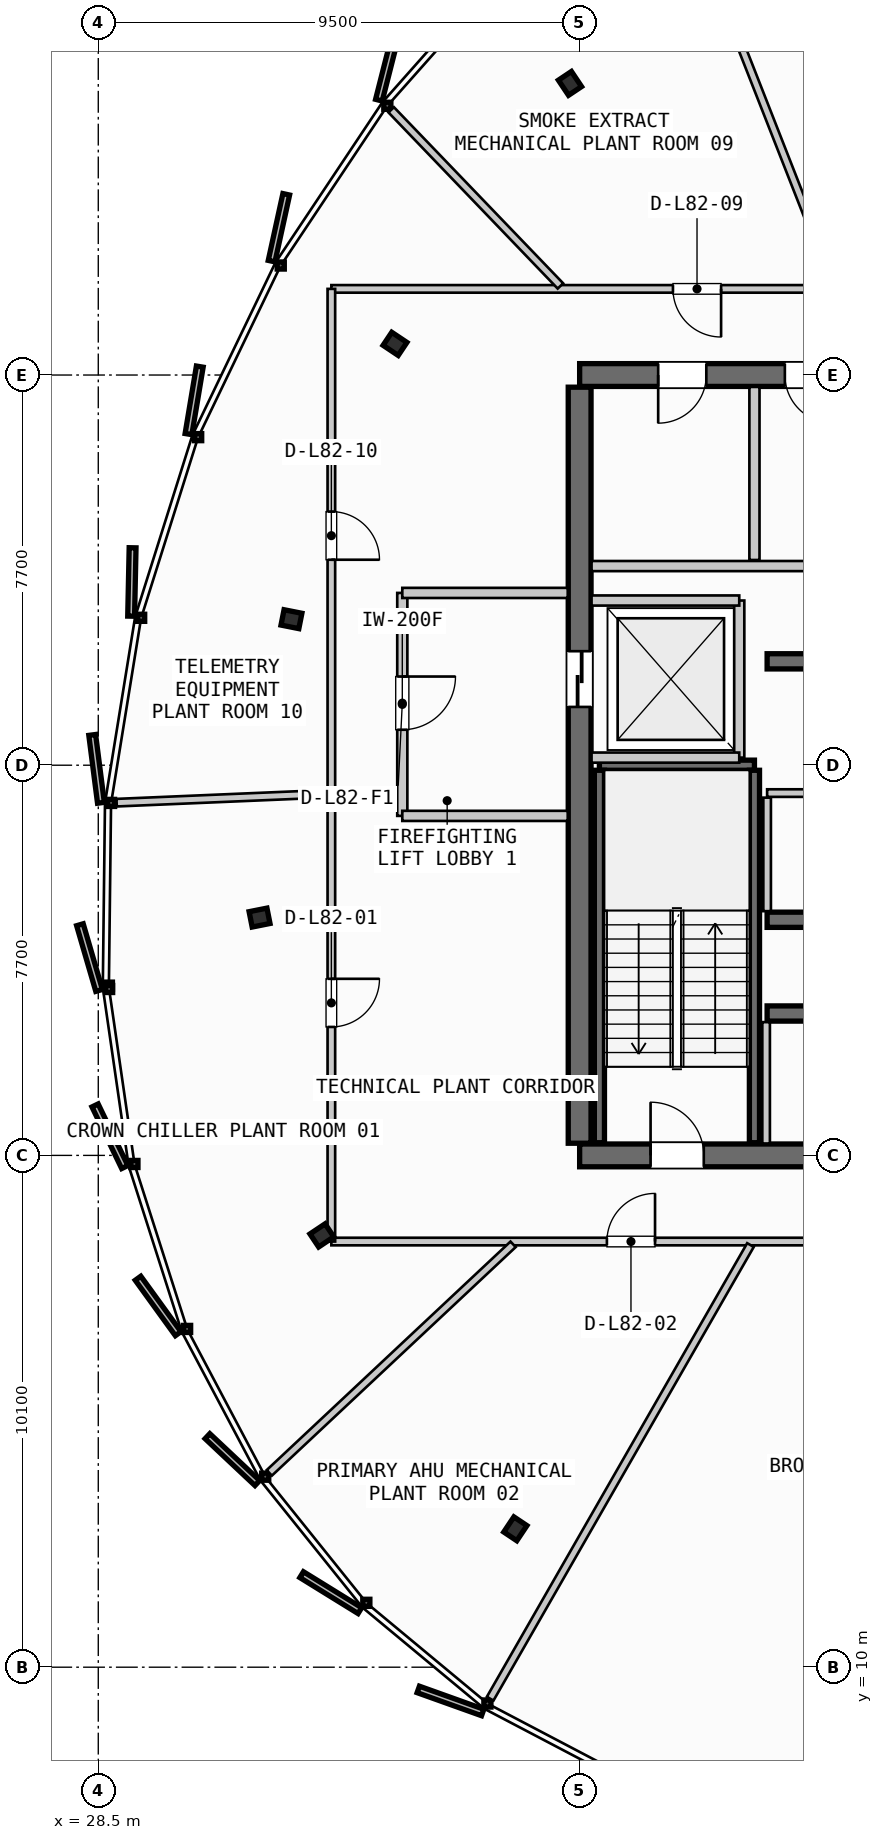
"""IFC4 building model, lengths in metres.
Left out: names, types, materials, properties, quantities, classifications, styles, units other than length and angle.
Written with IfcOpenShell. Run it as: python <this file> out.ifc"""

import sys

from ifc_helpers import new_model, si_unit, direction, frame, frame_2d, origin, origin_2d, place, context, subcontext, project, spatial, rectangle, i_section, extrude, source, transform, mapped, element, fill, save


model = new_model("IFC4")
c1 = context("Model", 3, precision=1e-05, world=origin(), true_north=direction((0.0, 1.0)))
c2 = subcontext(c1, "Body", "Model", "MODEL_VIEW")
j1 = project(units=[si_unit("LENGTHUNIT", "METRE"), si_unit("PLANEANGLEUNIT", "RADIAN")], contexts=[c1])
p1 = place(None, origin())
s1 = spatial("IfcSite", under=j1, at=p1, CompositionType="ELEMENT")
p2 = place(p1, origin())
s2 = spatial("IfcBuilding", under=s1, at=p2, CompositionType="ELEMENT")
p3 = place(p2, frame((0.0, 0.0, 308.3)))
s3 = spatial("IfcBuildingStorey", under=s2, at=p3, CompositionType="ELEMENT", Elevation=308.3)
p4 = place(p3, frame((38.0, 20.1, 0.0), z_axis=(0.0, 0.0, 1.0), x_axis=(1.0, 0.0, 0.0)))
e1 = element("IfcWall", 1, at=p4, inside=s3, PredefinedType="SHEAR", context=c2, shape_type="SweptSolid", body=[
    extrude(rectangle(XDim=17.6, YDim=0.45, at=frame_2d((8.8, 0.0))), origin(), (0.0, 0.0, 1.0), 3.735),
])
p5 = place(p4, frame((1.4, 0.0, 0.0)))
e2 = element("IfcOpeningElement", 2, at=p5, cuts=e1, PredefinedType="OPENING", context=c2, shape_type="SweptSolid", body=[
    extrude(rectangle(XDim=1.05, YDim=2.15, at=frame_2d((0.525, 1.075))), frame((0.0, 0.235, 0.0), z_axis=(0.0, -1.0, 0.0), x_axis=(1.0, 0.0, 0.0)), (0.0, 0.0, 1.0), 0.47),
])
p6 = place(p4, frame((15.15, 0.0, 0.0)))
e3 = element("IfcOpeningElement", 3, at=p6, cuts=e1, PredefinedType="OPENING", context=c2, shape_type="SweptSolid", body=[
    extrude(rectangle(XDim=1.05, YDim=2.15, at=frame_2d((0.525, 1.075))), frame((0.0, 0.235, 0.0), z_axis=(0.0, -1.0, 0.0), x_axis=(1.0, 0.0, 0.0)), (0.0, 0.0, 1.0), 0.47),
])
p7 = place(p4, frame((5.25, 0.0, 0.0)))
e4 = element("IfcOpeningElement", 4, at=p7, cuts=e1, PredefinedType="OPENING", context=c2, shape_type="SweptSolid", body=[
    extrude(rectangle(XDim=0.95, YDim=2.15, at=frame_2d((0.475, 1.075))), frame((0.0, 0.235, 0.0), z_axis=(0.0, -1.0, 0.0), x_axis=(1.0, 0.0, 0.0)), (0.0, 0.0, 1.0), 0.47),
])
p8 = place(p4, frame((11.4, 0.0, 0.0)))
e5 = element("IfcOpeningElement", 5, at=p8, cuts=e1, PredefinedType="OPENING", context=c2, shape_type="SweptSolid", body=[
    extrude(rectangle(XDim=0.95, YDim=2.15, at=frame_2d((0.475, 1.075))), frame((0.0, 0.235, 0.0), z_axis=(0.0, -1.0, 0.0), x_axis=(1.0, 0.0, 0.0)), (0.0, 0.0, 1.0), 0.47),
])
p9 = place(p3, frame((55.6, 35.5, 0.0), z_axis=(0.0, 0.0, 1.0), x_axis=(-1.0, 0.0, 0.0)))
e6 = element("IfcWall", 6, at=p9, inside=s3, PredefinedType="SHEAR", context=c2, shape_type="SweptSolid", body=[
    extrude(rectangle(XDim=17.6, YDim=0.45, at=frame_2d((8.8, 0.0))), origin(), (0.0, 0.0, 1.0), 3.735),
])
p10 = place(p9, frame((8.05, 0.0, 0.0)))
e7 = element("IfcOpeningElement", 7, at=p10, cuts=e6, PredefinedType="OPENING", context=c2, shape_type="SweptSolid", body=[
    extrude(rectangle(XDim=1.5, YDim=2.2, at=frame_2d((0.75, 1.1))), frame((0.0, 0.235, 0.0), z_axis=(0.0, -1.0, 0.0), x_axis=(1.0, 0.0, 0.0)), (0.0, 0.0, 1.0), 0.47),
])
p11 = place(p9, frame((15.1, 0.0, 0.0)))
e8 = element("IfcOpeningElement", 8, at=p11, cuts=e6, PredefinedType="OPENING", context=c2, shape_type="SweptSolid", body=[
    extrude(rectangle(XDim=0.95, YDim=2.15, at=frame_2d((0.475, 1.075))), frame((0.0, 0.235, 0.0), z_axis=(0.0, -1.0, 0.0), x_axis=(1.0, 0.0, 0.0)), (0.0, 0.0, 1.0), 0.47),
])
p12 = place(p9, frame((12.6, 0.0, 0.0)))
e9 = element("IfcOpeningElement", 9, at=p12, cuts=e6, PredefinedType="OPENING", context=c2, shape_type="SweptSolid", body=[
    extrude(rectangle(XDim=0.95, YDim=2.15, at=frame_2d((0.475, 1.075))), frame((0.0, 0.235, 0.0), z_axis=(0.0, -1.0, 0.0), x_axis=(1.0, 0.0, 0.0)), (0.0, 0.0, 1.0), 0.47),
])
p13 = place(p9, frame((10.45, 0.0, 0.0)))
e10 = element("IfcOpeningElement", 10, at=p13, cuts=e6, PredefinedType="OPENING", context=c2, shape_type="SweptSolid", body=[
    extrude(rectangle(XDim=0.95, YDim=2.15, at=frame_2d((0.475, 1.075))), frame((0.0, 0.235, 0.0), z_axis=(0.0, -1.0, 0.0), x_axis=(1.0, 0.0, 0.0)), (0.0, 0.0, 1.0), 0.47),
])
p14 = place(p3, frame((38.0, 35.26, 0.0), z_axis=(0.0, 0.0, 1.0), x_axis=(0.0, -1.0, 0.0)))
e11 = element("IfcWall", 11, at=p14, inside=s3, PredefinedType="SHEAR", context=c2, shape_type="SweptSolid", body=[
    extrude(rectangle(XDim=14.92, YDim=0.45, at=frame_2d((7.46, 0.0))), origin(), (0.0, 0.0, 1.0), 3.735),
])
p15 = place(p14, frame((5.21, 0.0, 0.0)))
e12 = element("IfcOpeningElement", 12, at=p15, cuts=e11, PredefinedType="OPENING", context=c2, shape_type="SweptSolid", body=[
    extrude(rectangle(XDim=1.1, YDim=2.2, at=frame_2d((0.55, 1.1))), frame((0.0, 0.235, 0.0), z_axis=(0.0, -1.0, 0.0), x_axis=(1.0, 0.0, 0.0)), (0.0, 0.0, 1.0), 0.47),
])
p16 = place(p3, frame((41.7, 22.9, 0.0), z_axis=(0.0, 0.0, 1.0), x_axis=(1.0, 0.0, 0.0)))
e13 = element("IfcWall", 13, at=p16, inside=s3, PredefinedType="SHEAR", context=c2, shape_type="SweptSolid", body=[
    extrude(rectangle(XDim=4.25, YDim=0.3, at=frame_2d((2.125, 0.0))), origin(), (0.0, 0.0, 1.0), 3.735),
])
p17 = place(p3, frame((41.7, 24.75, 0.0), z_axis=(0.0, 0.0, 1.0), x_axis=(1.0, 0.0, 0.0)))
e14 = element("IfcWall", 14, at=p17, inside=s3, PredefinedType="SHEAR", context=c2, shape_type="SweptSolid", body=[
    extrude(rectangle(XDim=4.25, YDim=0.3, at=frame_2d((2.125, 0.0))), origin(), (0.0, 0.0, 1.0), 3.735),
])
p18 = place(p17, frame((1.55, 0.0, 0.0)))
e15 = element("IfcOpeningElement", 15, at=p18, cuts=e14, PredefinedType="OPENING", context=c2, shape_type="SweptSolid", body=[
    extrude(rectangle(XDim=0.95, YDim=2.15, at=frame_2d((0.475, 1.075))), frame((0.0, 0.16, 0.0), z_axis=(0.0, -1.0, 0.0), x_axis=(1.0, 0.0, 0.0)), (0.0, 0.0, 1.0), 0.32),
])
p19 = place(p3, frame((41.7, 29.85, 0.0), z_axis=(0.0, 0.0, 1.0), x_axis=(1.0, 0.0, 0.0)))
e16 = element("IfcWall", 16, at=p19, inside=s3, PredefinedType="SHEAR", context=c2, shape_type="SweptSolid", body=[
    extrude(rectangle(XDim=4.25, YDim=0.3, at=frame_2d((2.125, 0.0))), origin(), (0.0, 0.0, 1.0), 3.735),
])
m1 = source(origin(), c2, "Body", "SweptSolid", [
    extrude(i_section(OverallWidth=0.309, OverallDepth=0.359, WebThickness=0.016, FlangeThickness=0.026, FilletRadius=0.027, at=origin_2d()), origin(), (0.0, 0.0, 1.0), 3.735),
])
for number, where, z_axis, x_axis in (
    (17, (37.81, 41.255, 0.0), (0.0, 0.0, 1.0), (-0.556, 0.831, 0.0)),
    (18, (34.356, 36.115, 0.0), (0.0, 0.0, 1.0), (-0.831, 0.556, 0.0)),
    (19, (32.312, 30.682, 0.0), (0.0, 0.0, 1.0), (-0.981, 0.195, 0.0)),
    (20, (31.683, 24.793, 0.0), (0.0, 0.0, 1.0), (-0.981, -0.195, 0.0)),
    (21, (32.913, 18.521, 0.0), (0.0, 0.0, 1.0), (-0.831, -0.556, 0.0)),
    (22, (36.731, 12.731, 0.0), (0.0, 0.0, 1.0), (-0.556, -0.831, 0.0)),
):
    element("IfcColumn", number, at=place(p3, frame(where, z_axis=z_axis, x_axis=x_axis)), inside=s3, PredefinedType="COLUMN", context=c2, shape_type="MappedRepresentation", body=[
        mapped(m1, transform((0.0, 0.0, 0.0), scale=1.0)),
    ])
p20 = place(p3, frame((38.39, 27.8, 0.0), z_axis=(0.0, 0.0, 1.0), x_axis=(1.0, 0.0, 0.0)))
e23 = element("IfcWall", 23, at=p20, inside=s3, PredefinedType="SHEAR", context=c2, shape_type="SweptSolid", body=[
    extrude(rectangle(XDim=3.06, YDim=0.2, at=frame_2d((1.53, 0.0))), origin(), (0.0, 0.0, 1.0), 3.735),
])
for number, where, z_axis, x_axis in (
    (24, (41.45, 27.7, 0.0), (0.0, 0.0, 1.0), (0.0, -1.0, 0.0)),
    (25, (38.39, 20.35, 0.0), (0.0, 0.0, 1.0), (0.0, 1.0, 0.0)),
):
    element("IfcWall", number, at=place(p3, frame(where, z_axis=z_axis, x_axis=x_axis)), inside=s3, PredefinedType="SHEAR", context=c2, shape_type="SweptSolid", body=[
        extrude(rectangle(XDim=7.35, YDim=0.2, at=frame_2d((3.675, 0.0))), origin(), (0.0, 0.0, 1.0), 3.735),
    ])
p21 = place(p3, frame((41.15, 27.95, 0.0), z_axis=(0.0, 0.0, 1.0), x_axis=(0.0, 1.0, 0.0)))
e26 = element("IfcWall", 26, at=p21, inside=s3, PredefinedType="PARTITIONING", context=c2, shape_type="SweptSolid", body=[
    extrude(rectangle(XDim=3.1, YDim=0.2, at=frame_2d((1.55, 0.0))), origin(), (0.0, 0.0, 1.0), 3.26),
])
for number, where, z_axis, x_axis in (
    (27, (38.235, 27.95, 0.0), (0.0, 0.0, 1.0), (1.0, 0.0, 0.0)),
    (28, (38.235, 31.05, 0.0), (0.0, 0.0, 1.0), (1.0, 0.0, 0.0)),
):
    element("IfcWall", number, at=place(p3, frame(where, z_axis=z_axis, x_axis=x_axis)), inside=s3, PredefinedType="PARTITIONING", context=c2, shape_type="SweptSolid", body=[
        extrude(rectangle(XDim=2.915, YDim=0.2, at=frame_2d((1.458, 0.0))), origin(), (0.0, 0.0, 1.0), 3.26),
    ])
p22 = place(p3, frame((34.5, 31.2, 0.0), z_axis=(0.0, 0.0, 1.0), x_axis=(0.0, -1.0, 0.0)))
e29 = element("IfcWall", 29, at=p22, inside=s3, PredefinedType="PARTITIONING", context=c2, shape_type="SweptSolid", body=[
    extrude(rectangle(XDim=4.4, YDim=0.2, at=frame_2d((2.2, 0.0))), origin(), (0.0, 0.0, 1.0), 3.26),
])
p23 = place(p22, frame((1.65, 0.0, 0.0)))
e30 = element("IfcOpeningElement", 30, at=p23, cuts=e29, PredefinedType="OPENING", context=c2, shape_type="SweptSolid", body=[
    extrude(rectangle(XDim=1.05, YDim=2.15, at=frame_2d((0.525, 1.075))), frame((0.0, 0.11, 0.0), z_axis=(0.0, -1.0, 0.0), x_axis=(1.0, 0.0, 0.0)), (0.0, 0.0, 1.0), 0.22),
])
for number, where, z_axis, x_axis in (
    (31, (34.5, 26.8, 0.0), (0.0, 0.0, 1.0), (1.0, 0.0, 0.0)),
    (32, (34.5, 31.2, 0.0), (0.0, 0.0, 1.0), (1.0, 0.0, 0.0)),
):
    element("IfcWall", number, at=place(p3, frame(where, z_axis=z_axis, x_axis=x_axis)), inside=s3, PredefinedType="PARTITIONING", context=c2, shape_type="SweptSolid", body=[
        extrude(rectangle(XDim=3.265, YDim=0.2, at=frame_2d((1.632, 0.0))), origin(), (0.0, 0.0, 1.0), 3.26),
    ])
p24 = place(p3, frame((41.68, 20.335, 0.0), z_axis=(0.0, 0.0, 1.0), x_axis=(0.0, 1.0, 0.0)))
e33 = element("IfcWall", 33, at=p24, inside=s3, PredefinedType="PARTITIONING", context=c2, shape_type="SweptSolid", body=[
    extrude(rectangle(XDim=2.395, YDim=0.15, at=frame_2d((1.198, 0.0))), origin(), (0.0, 0.0, 1.0), 3.26),
])
p25 = place(p3, frame((41.7, 27.25, 0.0), z_axis=(0.0, 0.0, 1.0), x_axis=(1.0, 0.0, 0.0)))
e34 = element("IfcWall", 34, at=p25, inside=s3, PredefinedType="PARTITIONING", context=c2, shape_type="SweptSolid", body=[
    extrude(rectangle(XDim=4.25, YDim=0.15, at=frame_2d((2.125, 0.0))), origin(), (0.0, 0.0, 1.0), 3.26),
])
p26 = place(p3, frame((41.7, 24.92, 0.0), z_axis=(0.0, 0.0, 1.0), x_axis=(0.0, 1.0, 0.0)))
e35 = element("IfcWall", 35, at=p26, inside=s3, PredefinedType="PARTITIONING", context=c2, shape_type="SweptSolid", body=[
    extrude(rectangle(XDim=2.24, YDim=0.15, at=frame_2d((1.12, 0.0))), origin(), (0.0, 0.0, 1.0), 3.26),
])
p27 = place(p3, frame((41.45, 31.85, 0.0), z_axis=(0.0, 0.0, 1.0), x_axis=(0.0, 1.0, 0.0)))
e36 = element("IfcWall", 36, at=p27, inside=s3, PredefinedType="PARTITIONING", context=c2, shape_type="SweptSolid", body=[
    extrude(rectangle(XDim=3.415, YDim=0.2, at=frame_2d((1.708, 0.0))), origin(), (0.0, 0.0, 1.0), 3.26),
])
p28 = place(p3, frame((38.235, 31.73, 0.0), z_axis=(0.0, 0.0, 1.0), x_axis=(1.0, 0.0, 0.0)))
e37 = element("IfcWall", 37, at=p28, inside=s3, PredefinedType="PARTITIONING", context=c2, shape_type="SweptSolid", body=[
    extrude(rectangle(XDim=7.565, YDim=0.2, at=frame_2d((3.782, 0.0))), origin(), (0.0, 0.0, 1.0), 3.26),
])
p29 = place(p3, frame((33.1, 18.4, 0.0), z_axis=(0.0, 0.0, 1.0), x_axis=(1.0, 0.0, 0.0)))
e38 = element("IfcWall", 38, at=p29, inside=s3, PredefinedType="PARTITIONING", context=c2, shape_type="SweptSolid", body=[
    extrude(rectangle(XDim=27.4, YDim=0.15, at=frame_2d((13.7, 0.0))), origin(), (0.0, 0.0, 1.0), 3.26),
])
p30 = place(p29, frame((5.438, 0.0, 0.0)))
e39 = element("IfcOpeningElement", 39, at=p30, cuts=e38, PredefinedType="OPENING", context=c2, shape_type="SweptSolid", body=[
    extrude(rectangle(XDim=0.95, YDim=2.15, at=frame_2d((0.475, 1.075))), frame((0.0, 0.085, 0.0), z_axis=(0.0, -1.0, 0.0), x_axis=(1.0, 0.0, 0.0)), (0.0, 0.0, 1.0), 0.17),
])
p31 = place(p29, frame((12.49, 0.0, 0.0)))
e40 = element("IfcOpeningElement", 40, at=p31, cuts=e38, PredefinedType="OPENING", context=c2, shape_type="SweptSolid", body=[
    extrude(rectangle(XDim=0.95, YDim=2.15, at=frame_2d((0.475, 1.075))), frame((0.0, 0.085, 0.0), z_axis=(0.0, -1.0, 0.0), x_axis=(1.0, 0.0, 0.0)), (0.0, 0.0, 1.0), 0.17),
])
p32 = place(p29, frame((19.863, 0.0, 0.0)))
e41 = element("IfcOpeningElement", 41, at=p32, cuts=e38, PredefinedType="OPENING", context=c2, shape_type="SweptSolid", body=[
    extrude(rectangle(XDim=0.95, YDim=2.15, at=frame_2d((0.475, 1.075))), frame((0.0, 0.085, 0.0), z_axis=(0.0, -1.0, 0.0), x_axis=(1.0, 0.0, 0.0)), (0.0, 0.0, 1.0), 0.17),
])
p33 = place(p3, frame((60.5, 37.2, 0.0), z_axis=(0.0, 0.0, 1.0), x_axis=(-1.0, 0.0, 0.0)))
e42 = element("IfcWall", 42, at=p33, inside=s3, PredefinedType="PARTITIONING", context=c2, shape_type="SweptSolid", body=[
    extrude(rectangle(XDim=27.4, YDim=0.15, at=frame_2d((13.7, 0.0))), origin(), (0.0, 0.0, 1.0), 3.26),
])
p34 = place(p33, frame((4.03, 0.0, 0.0)))
e43 = element("IfcOpeningElement", 43, at=p34, cuts=e42, PredefinedType="OPENING", context=c2, shape_type="SweptSolid", body=[
    extrude(rectangle(XDim=0.95, YDim=2.15, at=frame_2d((0.475, 1.075))), frame((0.0, 0.085, 0.0), z_axis=(0.0, -1.0, 0.0), x_axis=(1.0, 0.0, 0.0)), (0.0, 0.0, 1.0), 0.17),
])
p35 = place(p33, frame((12.447, 0.0, 0.0)))
e44 = element("IfcOpeningElement", 44, at=p35, cuts=e42, PredefinedType="OPENING", context=c2, shape_type="SweptSolid", body=[
    extrude(rectangle(XDim=0.95, YDim=2.15, at=frame_2d((0.475, 1.075))), frame((0.0, 0.085, 0.0), z_axis=(0.0, -1.0, 0.0), x_axis=(1.0, 0.0, 0.0)), (0.0, 0.0, 1.0), 0.17),
])
p36 = place(p33, frame((19.708, 0.0, 0.0)))
e45 = element("IfcOpeningElement", 45, at=p36, cuts=e42, PredefinedType="OPENING", context=c2, shape_type="SweptSolid", body=[
    extrude(rectangle(XDim=0.95, YDim=2.15, at=frame_2d((0.475, 1.075))), frame((0.0, 0.085, 0.0), z_axis=(0.0, -1.0, 0.0), x_axis=(1.0, 0.0, 0.0)), (0.0, 0.0, 1.0), 0.17),
])
p37 = place(p3, frame((33.1, 37.2, 0.0), z_axis=(0.0, 0.0, 1.0), x_axis=(0.0, -1.0, 0.0)))
e46 = element("IfcWall", 46, at=p37, inside=s3, PredefinedType="PARTITIONING", context=c2, shape_type="SweptSolid", body=[
    extrude(rectangle(XDim=18.8, YDim=0.15, at=frame_2d((9.4, 0.0))), origin(), (0.0, 0.0, 1.0), 3.26),
])
p38 = place(p37, frame((13.615, 0.0, 0.0)))
e47 = element("IfcOpeningElement", 47, at=p38, cuts=e46, PredefinedType="OPENING", context=c2, shape_type="SweptSolid", body=[
    extrude(rectangle(XDim=0.95, YDim=2.15, at=frame_2d((0.475, 1.075))), frame((0.0, 0.085, 0.0), z_axis=(0.0, -1.0, 0.0), x_axis=(1.0, 0.0, 0.0)), (0.0, 0.0, 1.0), 0.17),
])
p39 = place(p37, frame((4.395, 0.0, 0.0)))
e48 = element("IfcOpeningElement", 48, at=p39, cuts=e46, PredefinedType="OPENING", context=c2, shape_type="SweptSolid", body=[
    extrude(rectangle(XDim=0.95, YDim=2.15, at=frame_2d((0.475, 1.075))), frame((0.0, 0.085, 0.0), z_axis=(0.0, -1.0, 0.0), x_axis=(1.0, 0.0, 0.0)), (0.0, 0.0, 1.0), 0.17),
])
p40 = place(p3, frame((33.02, 27.237, 0.0), z_axis=(0.0, 0.0, 1.0), x_axis=(-0.999104990003, -0.042299160176, 0.0)))
e49 = element("IfcWall", 49, at=p40, inside=s3, PredefinedType="PARTITIONING", context=c2, shape_type="SweptSolid", body=[
    extrude(rectangle(XDim=4.161, YDim=0.15, at=frame_2d((2.081, 0.0))), origin(), (0.0, 0.0, 1.0), 3.26),
])
p41 = place(p3, frame((36.687, 18.345, 0.0), z_axis=(0.0, 0.0, 1.0), x_axis=(-0.729594919554, -0.683879560566, 0.0)))
e50 = element("IfcWall", 50, at=p41, inside=s3, PredefinedType="PARTITIONING", context=c2, shape_type="SweptSolid", body=[
    extrude(rectangle(XDim=6.595, YDim=0.15, at=frame_2d((3.298, 0.0))), origin(), (0.0, 0.0, 1.0), 3.26),
])
p42 = place(p3, frame((41.371, 18.331, 0.0), z_axis=(0.0, 0.0, 1.0), x_axis=(-0.497725179065, -0.867334794716, 0.0)))
e51 = element("IfcWall", 51, at=p42, inside=s3, PredefinedType="PARTITIONING", context=c2, shape_type="SweptSolid", body=[
    extrude(rectangle(XDim=10.321, YDim=0.15, at=frame_2d((5.16, 0.0))), origin(), (0.0, 0.0, 1.0), 3.26),
])
p43 = place(p3, frame((43.038, 37.274, 0.0), z_axis=(0.0, 0.0, 1.0), x_axis=(-0.365328438703, 0.930878688055, 0.0)))
e52 = element("IfcWall", 52, at=p43, inside=s3, PredefinedType="PARTITIONING", context=c2, shape_type="SweptSolid", body=[
    extrude(rectangle(XDim=9.351, YDim=0.15, at=frame_2d((4.676, 0.0))), origin(), (0.0, 0.0, 1.0), 3.26),
])
p44 = place(p3, frame((37.621, 37.258, 0.0), z_axis=(0.0, 0.0, 1.0), x_axis=(-0.692861722407, 0.72107047757, 0.0)))
e53 = element("IfcWall", 53, at=p44, inside=s3, PredefinedType="PARTITIONING", context=c2, shape_type="SweptSolid", body=[
    extrude(rectangle(XDim=4.821, YDim=0.15, at=frame_2d((2.41, 0.0))), origin(), (0.0, 0.0, 1.0), 3.26),
])
m2 = source(origin(), c2, "Body", "SweptSolid", [
    extrude(rectangle(XDim=1.05, YDim=2.15, at=frame_2d((0.525, 1.075))), frame((0.0, 0.025, 0.0), z_axis=(0.0, -1.0, 0.0), x_axis=(1.0, 0.0, 0.0)), (0.0, 0.0, 1.0), 0.05),
])
p45 = place(p5, origin())
e54 = element("IfcDoor", 54, at=p45, inside=s3, OperationType="SINGLE_SWING_LEFT", PredefinedType="DOOR", context=c2, shape_type="MappedRepresentation", body=[
    mapped(m2, transform((0.0, 0.0, 0.0), scale=1.0)),
])
fill(e2, e54)
m3 = source(origin(), c2, "Body", "SweptSolid", [
    extrude(rectangle(XDim=1.1, YDim=2.2, at=frame_2d((0.55, 1.1))), frame((0.0, 0.025, 0.0), z_axis=(0.0, -1.0, 0.0), x_axis=(1.0, 0.0, 0.0)), (0.0, 0.0, 1.0), 0.05),
])
p46 = place(p15, origin())
e55 = element("IfcDoor", 55, at=p46, inside=s3, OperationType="SLIDING_TO_LEFT", PredefinedType="DOOR", context=c2, shape_type="MappedRepresentation", body=[
    mapped(m3, transform((0.0, 0.0, 0.0), scale=1.0)),
])
fill(e12, e55)
m4 = source(origin(), c2, "Body", "SweptSolid", [
    extrude(rectangle(XDim=0.95, YDim=2.15, at=frame_2d((0.475, 1.075))), frame((0.0, 0.025, 0.0), z_axis=(0.0, -1.0, 0.0), x_axis=(1.0, 0.0, 0.0)), (0.0, 0.0, 1.0), 0.05),
])
p47 = place(p11, origin())
e56 = element("IfcDoor", 56, at=p47, inside=s3, OperationType="SINGLE_SWING_RIGHT", PredefinedType="DOOR", context=c2, shape_type="MappedRepresentation", body=[
    mapped(m4, transform((0.0, 0.0, 0.0), scale=1.0)),
])
fill(e8, e56)
p48 = place(p12, origin())
e57 = element("IfcDoor", 57, at=p48, inside=s3, OperationType="SINGLE_SWING_LEFT", PredefinedType="DOOR", context=c2, shape_type="MappedRepresentation", body=[
    mapped(m4, transform((0.0, 0.0, 0.0), scale=1.0)),
])
fill(e9, e57)
p49 = place(p23, origin())
e58 = element("IfcDoor", 58, at=p49, inside=s3, OperationType="SINGLE_SWING_LEFT", PredefinedType="DOOR", context=c2, shape_type="MappedRepresentation", body=[
    mapped(m2, transform((0.0, 0.0, 0.0), scale=1.0)),
])
fill(e30, e58)
p50 = place(p30, origin())
e59 = element("IfcDoor", 59, at=p50, inside=s3, OperationType="SINGLE_SWING_RIGHT", PredefinedType="DOOR", context=c2, shape_type="MappedRepresentation", body=[
    mapped(m4, transform((0.0, 0.0, 0.0), scale=1.0)),
])
fill(e39, e59)
p51 = place(p36, origin())
e60 = element("IfcDoor", 60, at=p51, inside=s3, OperationType="SINGLE_SWING_LEFT", PredefinedType="DOOR", context=c2, shape_type="MappedRepresentation", body=[
    mapped(m4, transform((0.0, 0.0, 0.0), scale=1.0)),
])
fill(e45, e60)
p52 = place(p38, origin())
e61 = element("IfcDoor", 61, at=p52, inside=s3, OperationType="SINGLE_SWING_LEFT", PredefinedType="DOOR", context=c2, shape_type="MappedRepresentation", body=[
    mapped(m4, transform((0.0, 0.0, 0.0), scale=1.0)),
])
fill(e47, e61)
p53 = place(p39, origin())
e62 = element("IfcDoor", 62, at=p53, inside=s3, OperationType="SINGLE_SWING_RIGHT", PredefinedType="DOOR", context=c2, shape_type="MappedRepresentation", body=[
    mapped(m4, transform((0.0, 0.0, 0.0), scale=1.0)),
])
fill(e48, e62)
save(model, sys.argv[1])
